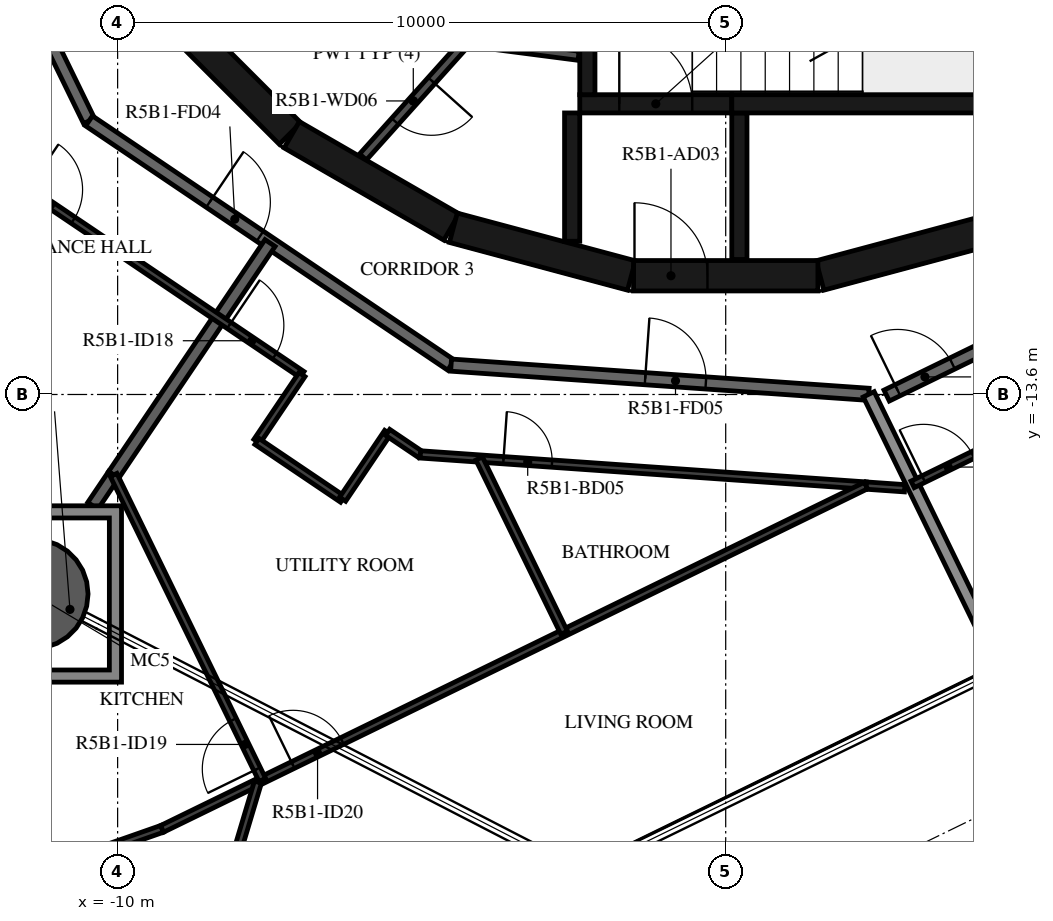
"""IFC4 building model, lengths in metres.
Left out: names, types, materials, properties, quantities, classifications, styles, units other than length and angle.
Written with IfcOpenShell. Run it as: python <this file> out.ifc"""

import sys

from ifc_helpers import new_model, si_unit, direction, frame, frame_2d, origin, origin_2d, place, context, subcontext, project, spatial, polyline, rectangle, hollow_circle, outline, extrude, element, fill, save


model = new_model("IFC4")
c1 = context("Model", 3, precision=1e-05, world=origin(), true_north=direction((0.0, 1.0)))
c2 = subcontext(c1, "Body", "Model", "MODEL_VIEW")
j1 = project(units=[si_unit("LENGTHUNIT", "METRE"), si_unit("PLANEANGLEUNIT", "RADIAN")], contexts=[c1])
p1 = place(None, origin())
s1 = spatial("IfcSite", under=j1, at=p1, CompositionType="ELEMENT")
p2 = place(p1, origin())
s2 = spatial("IfcBuilding", under=s1, at=p2, CompositionType="ELEMENT")
p3 = place(p2, frame((0.0, 0.0, 198.9)))
s3 = spatial("IfcBuildingStorey", under=s2, at=p3, CompositionType="ELEMENT", Elevation=198.9)
p4 = place(p3, frame((-11.386, -16.881, -0.38), z_axis=(0.0, 0.0, 1.0), x_axis=(1.0, 0.0, 0.0)))
e1 = element("IfcColumn", 1, at=p4, inside=s3, PredefinedType="COLUMN", context=c2, shape_type="SweptSolid", body=[
    extrude(hollow_circle(Radius=0.9, WallThickness=0.04, at=origin_2d()), origin(), (0.0, 0.0, 1.0), 3.5),
])
p5 = place(p3, frame((1.55, -11.643, 0.0), z_axis=(0.0, 0.0, 1.0), x_axis=(0.965948410781, 0.258734743916, 0.0)))
e2 = element("IfcWall", 2, at=p5, inside=s3, PredefinedType="SHEAR", context=c2, shape_type="SweptSolid", body=[
    extrude(rectangle(XDim=3.033, YDim=0.5, at=frame_2d((1.516, 0.0))), origin(), (0.0, 0.0, 1.0), 3.12),
])
p6 = place(p3, frame((-9.308, -7.164, 0.0), z_axis=(0.0, 0.0, 1.0), x_axis=(0.707106781187, -0.707106781187, 0.0)))
e3 = element("IfcWall", 3, at=p6, inside=s3, PredefinedType="SHEAR", context=c2, shape_type="SweptSolid", body=[
    extrude(rectangle(XDim=3.032, YDim=0.5, at=frame_2d((1.516, 0.0))), origin(), (0.0, 0.0, 1.0), 3.12),
])
for number, where, z_axis, x_axis in (
    (4, (-7.137, -9.329, 0.0), (0.0, 0.0, 1.0), (0.866, -0.5, 0.0)),
    (5, (-4.479, -10.858, 0.0), (0.0, 0.0, 1.0), (0.966, -0.259, 0.0)),
):
    element("IfcWall", number, at=place(p3, frame(where, z_axis=z_axis, x_axis=x_axis)), inside=s3, PredefinedType="SHEAR", context=c2, shape_type="SweptSolid", body=[
        extrude(rectangle(XDim=3.033, YDim=0.5, at=frame_2d((1.516, 0.0))), origin(), (0.0, 0.0, 1.0), 3.12),
    ])
p7 = place(p3, frame((-1.516, -11.647, 0.0), z_axis=(0.0, 0.0, 1.0), x_axis=(1.0, 0.0, 0.0)))
e6 = element("IfcWall", 6, at=p7, inside=s3, PredefinedType="SHEAR", context=c2, shape_type="SweptSolid", body=[
    extrude(rectangle(XDim=3.033, YDim=0.5, at=frame_2d((1.516, 0.0))), origin(), (0.0, 0.0, 1.0), 3.12),
])
p8 = place(p7, frame((0.016, 0.0, 0.0)))
e7 = element("IfcOpeningElement", 7, at=p8, cuts=e6, PredefinedType="OPENING", context=c2, shape_type="SweptSolid", body=[
    extrude(rectangle(XDim=1.2, YDim=2.1, at=frame_2d((0.6, 1.05))), frame((0.0, 0.26, 0.0), z_axis=(0.0, -1.0, 0.0), x_axis=(1.0, 0.0, 0.0)), (0.0, 0.0, 1.0), 0.52),
])
p9 = place(p3, frame((-2.275, -8.67, 0.0), z_axis=(0.0, 0.0, 1.0), x_axis=(0.0, 1.0, 0.0)))
e8 = element("IfcWall", 8, at=p9, inside=s3, PredefinedType="SHEAR", context=c2, shape_type="SweptSolid", body=[
    extrude(rectangle(XDim=3.32, YDim=0.25, at=frame_2d((1.66, 0.0))), origin(), (0.0, 0.0, 1.0), 3.12),
])
p10 = place(p3, frame((0.1, -8.82, 0.0), z_axis=(0.0, 0.0, 1.0), x_axis=(1.0, 0.0, 0.0)))
e9 = element("IfcWall", 9, at=p10, inside=s3, PredefinedType="SHEAR", context=c2, shape_type="SweptSolid", body=[
    extrude(rectangle(XDim=4.55, YDim=0.3, at=frame_2d((2.275, 0.0))), origin(), (0.0, 0.0, 1.0), 3.12),
])
p11 = place(p3, frame((-2.4, -8.82, 0.0), z_axis=(0.0, 0.0, 1.0), x_axis=(1.0, 0.0, 0.0)))
e10 = element("IfcWall", 10, at=p11, inside=s3, PredefinedType="SHEAR", context=c2, shape_type="SweptSolid", body=[
    extrude(rectangle(XDim=2.5, YDim=0.3, at=frame_2d((1.25, 0.0))), origin(), (0.0, 0.0, 1.0), 3.12),
])
p12 = place(p11, frame((0.65, 0.0, 0.0)))
e11 = element("IfcOpeningElement", 11, at=p12, cuts=e10, PredefinedType="OPENING", context=c2, shape_type="SweptSolid", body=[
    extrude(rectangle(XDim=1.2, YDim=2.1, at=frame_2d((0.6, 1.05))), frame((0.0, 0.16, 0.0), z_axis=(0.0, -1.0, 0.0), x_axis=(1.0, 0.0, 0.0)), (0.0, 0.0, 1.0), 0.32),
])
p13 = place(p3, frame((-2.525, -8.97, 0.0), z_axis=(0.0, 0.0, 1.0), x_axis=(0.0, -1.0, 0.0)))
e12 = element("IfcWall", 12, at=p13, inside=s3, PredefinedType="SHEAR", context=c2, shape_type="SweptSolid", body=[
    extrude(rectangle(XDim=2.11, YDim=0.25, at=frame_2d((1.055, 0.0))), origin(), (0.0, 0.0, 1.0), 3.12),
])
p14 = place(p3, frame((0.225, -8.97, 0.0), z_axis=(0.0, 0.0, 1.0), x_axis=(0.0, -1.0, 0.0)))
e13 = element("IfcWall", 13, at=p14, inside=s3, PredefinedType="SHEAR", context=c2, shape_type="SweptSolid", body=[
    extrude(rectangle(XDim=2.41, YDim=0.25, at=frame_2d((1.205, 0.0))), origin(), (0.0, 0.0, 1.0), 3.12),
])
p15 = place(p3, frame((-4.311, -7.851, 0.0), z_axis=(0.0, 0.0, 1.0), x_axis=(-0.667869133096, -0.744278725383, 0.0)))
e14 = element("IfcWall", 14, at=p15, inside=s3, PredefinedType="PARTITIONING", context=c2, shape_type="SweptSolid", body=[
    extrude(rectangle(XDim=2.476, YDim=0.15, at=frame_2d((1.238, 0.0))), origin(), (0.0, 0.0, 1.0), 3.12),
])
p16 = place(p15, frame((0.788, 0.0, 0.0)))
e15 = element("IfcOpeningElement", 15, at=p16, cuts=e14, PredefinedType="OPENING", context=c2, shape_type="SweptSolid", body=[
    extrude(rectangle(XDim=0.9, YDim=2.1, at=frame_2d((0.45, 1.05))), frame((0.0, 0.085, 0.0), z_axis=(0.0, -1.0, 0.0), x_axis=(1.0, 0.0, 0.0)), (0.0, 0.0, 1.0), 0.17),
])
p17 = place(p3, frame((-4.198, -7.799, 0.0), z_axis=(0.0, 0.0, 1.0), x_axis=(0.991686747293, -0.128675542523, 0.0)))
e16 = element("IfcWall", 16, at=p17, inside=s3, PredefinedType="PARTITIONING", context=c2, shape_type="SweptSolid", body=[
    extrude(rectangle(XDim=1.793, YDim=0.15, at=frame_2d((0.896, 0.0))), origin(), (0.0, 0.0, 1.0), 3.12),
])
p18 = place(p3, frame((-11.633, -6.716, 0.0), z_axis=(0.0, 0.0, 1.0), x_axis=(0.438322116278, -0.898817958422, 0.0)))
e17 = element("IfcWall", 17, at=p18, inside=s3, PredefinedType="STANDARD", context=c2, shape_type="SweptSolid", body=[
    extrude(rectangle(XDim=2.654, YDim=0.2, at=frame_2d((1.327, 0.0))), origin(), (0.0, 0.0, 1.0), 3.12),
])
p19 = place(p3, frame((-10.47, -9.101, 0.0), z_axis=(0.0, 0.0, 1.0), x_axis=(0.829035841718, -0.559195469534, 0.0)))
e18 = element("IfcWall", 18, at=p19, inside=s3, PredefinedType="STANDARD", context=c2, shape_type="SweptSolid", body=[
    extrude(rectangle(XDim=7.181, YDim=0.2, at=frame_2d((3.591, 0.0))), origin(), (0.0, 0.0, 1.0), 3.12),
])
p20 = place(p19, frame((2.39, 0.0, 0.0)))
e19 = element("IfcOpeningElement", 19, at=p20, cuts=e18, PredefinedType="OPENING", context=c2, shape_type="SweptSolid", body=[
    extrude(rectangle(XDim=1.0, YDim=2.1, at=frame_2d((0.5, 1.05))), frame((0.0, 0.11, 0.0), z_axis=(0.0, -1.0, 0.0), x_axis=(1.0, 0.0, 0.0)), (0.0, 0.0, 1.0), 0.22),
])
p21 = place(p3, frame((-4.517, -13.117, 0.0), z_axis=(0.0, 0.0, 1.0), x_axis=(0.997564669554, -0.069747616856, 0.0)))
e20 = element("IfcWall", 20, at=p21, inside=s3, PredefinedType="STANDARD", context=c2, shape_type="SweptSolid", body=[
    extrude(rectangle(XDim=6.885, YDim=0.2, at=frame_2d((3.443, 0.0))), origin(), (0.0, 0.0, 1.0), 3.12),
])
p22 = place(p21, frame((3.2, 0.0, 0.0)))
e21 = element("IfcOpeningElement", 21, at=p22, cuts=e20, PredefinedType="OPENING", context=c2, shape_type="SweptSolid", body=[
    extrude(rectangle(XDim=1.0, YDim=2.1, at=frame_2d((0.5, 1.05))), frame((0.0, 0.11, 0.0), z_axis=(0.0, -1.0, 0.0), x_axis=(1.0, 0.0, 0.0)), (0.0, 0.0, 1.0), 0.22),
])
p23 = place(p3, frame((2.647, -13.618, 0.0), z_axis=(0.0, 0.0, 1.0), x_axis=(0.898796543751, 0.438366026218, 0.0)))
e22 = element("IfcWall", 22, at=p23, inside=s3, PredefinedType="STANDARD", context=c2, shape_type="SweptSolid", body=[
    extrude(rectangle(XDim=7.181, YDim=0.2, at=frame_2d((3.591, 0.0))), origin(), (0.0, 0.0, 1.0), 3.12),
])
p24 = place(p23, frame((0.2, 0.0, 0.0)))
e23 = element("IfcOpeningElement", 23, at=p24, cuts=e22, PredefinedType="OPENING", context=c2, shape_type="SweptSolid", body=[
    extrude(rectangle(XDim=1.0, YDim=2.1, at=frame_2d((0.5, 1.05))), frame((0.0, 0.11, 0.0), z_axis=(0.0, -1.0, 0.0), x_axis=(1.0, 0.0, 0.0)), (0.0, 0.0, 1.0), 0.22),
])
p25 = place(p3, frame((-10.066, -14.924, 0.0), z_axis=(0.0, 0.0, 1.0), x_axis=(0.559173899945, 0.829050390278, 0.0)))
e24 = element("IfcWall", 24, at=p25, inside=s3, PredefinedType="STANDARD", context=c2, shape_type="SweptSolid", body=[
    extrude(rectangle(XDim=4.601, YDim=0.2, at=frame_2d((2.301, 0.0))), origin(), (0.0, 0.0, 1.0), 3.12),
])
p26 = place(p3, frame((-10.408, -15.43, 0.0), z_axis=(0.0, 0.0, 1.0), x_axis=(0.559390561924, 0.828904215956, 0.0)))
e25 = element("IfcWall", 25, at=p26, inside=s3, PredefinedType="STANDARD", context=c2, shape_type="SweptSolid", body=[
    extrude(rectangle(XDim=0.612, YDim=0.2, at=frame_2d((0.306, 0.0))), origin(), (0.0, 0.0, 1.0), 3.12),
])
p27 = place(p3, frame((4.512, -18.027, 0.0), z_axis=(0.0, 0.0, 1.0), x_axis=(-0.438374835386, 0.898792247241, 0.0)))
e26 = element("IfcWall", 26, at=p27, inside=s3, PredefinedType="STANDARD", context=c2, shape_type="SweptSolid", body=[
    extrude(rectangle(XDim=4.929, YDim=0.2, at=frame_2d((2.464, 0.0))), origin(), (0.0, 0.0, 1.0), 2.73),
])
p28 = place(p3, frame((-11.642, -10.12, 0.0), z_axis=(0.0, 0.0, 1.0), x_axis=(0.829033377599, -0.559199122698, 0.0)))
e27 = element("IfcWall", 27, at=p28, inside=s3, PredefinedType="PARTITIONING", context=c2, shape_type="SweptSolid", body=[
    extrude(rectangle(XDim=5.638, YDim=0.12, at=frame_2d((2.819, 0.0))), origin(), (0.0, 0.0, 1.0), 3.12),
])
p29 = place(p28, frame((0.2, 0.0, 0.0)))
e28 = element("IfcOpeningElement", 28, at=p29, cuts=e27, PredefinedType="OPENING", context=c2, shape_type="SweptSolid", body=[
    extrude(rectangle(XDim=0.9, YDim=2.1, at=frame_2d((0.45, 1.05))), frame((0.0, 0.07, 0.0), z_axis=(0.0, -1.0, 0.0), x_axis=(1.0, 0.0, 0.0)), (0.0, 0.0, 1.0), 0.14),
])
p30 = place(p28, frame((4.192, 0.0, 0.0)))
e29 = element("IfcOpeningElement", 29, at=p30, cuts=e27, PredefinedType="OPENING", context=c2, shape_type="SweptSolid", body=[
    extrude(rectangle(XDim=0.9, YDim=2.1, at=frame_2d((0.45, 1.05))), frame((0.0, 0.07, 0.0), z_axis=(0.0, -1.0, 0.0), x_axis=(1.0, 0.0, 0.0)), (0.0, 0.0, 1.0), 0.14),
])
p31 = place(p3, frame((-6.968, -13.273, 0.0), z_axis=(0.0, 0.0, 1.0), x_axis=(-0.559283007371, -0.828976789582, 0.0)))
e30 = element("IfcWall", 30, at=p31, inside=s3, PredefinedType="PARTITIONING", context=c2, shape_type="SweptSolid", body=[
    extrude(rectangle(XDim=1.325, YDim=0.12, at=frame_2d((0.663, 0.0))), origin(), (0.0, 0.0, 1.0), 3.12),
])
p32 = place(p3, frame((-7.709, -14.371, 0.0), z_axis=(0.0, 0.0, 1.0), x_axis=(0.829033422808, -0.559199055675, 0.0)))
e31 = element("IfcWall", 31, at=p32, inside=s3, PredefinedType="PARTITIONING", context=c2, shape_type="SweptSolid", body=[
    extrude(rectangle(XDim=1.7, YDim=0.12, at=frame_2d((0.85, 0.0))), origin(), (0.0, 0.0, 1.0), 3.12),
])
p33 = place(p3, frame((-6.3, -15.322, 0.0), z_axis=(0.0, 0.0, 1.0), x_axis=(0.559197608403, 0.829034399019, 0.0)))
e32 = element("IfcWall", 32, at=p33, inside=s3, PredefinedType="PARTITIONING", context=c2, shape_type="SweptSolid", body=[
    extrude(rectangle(XDim=1.325, YDim=0.12, at=frame_2d((0.663, 0.0))), origin(), (0.0, 0.0, 1.0), 3.12),
])
p34 = place(p3, frame((-5.559, -14.223, 0.0), z_axis=(0.0, 0.0, 1.0), x_axis=(0.828844300469, -0.559479334363, 0.0)))
e33 = element("IfcWall", 33, at=p34, inside=s3, PredefinedType="PARTITIONING", context=c2, shape_type="SweptSolid", body=[
    extrude(rectangle(XDim=0.647, YDim=0.12, at=frame_2d((0.324, 0.0))), origin(), (0.0, 0.0, 1.0), 3.12),
])
p35 = place(p3, frame((-5.022, -14.585, 0.0), z_axis=(0.0, 0.0, 1.0), x_axis=(0.997564196041, -0.06975438895, 0.0)))
e34 = element("IfcWall", 34, at=p35, inside=s3, PredefinedType="PARTITIONING", context=c2, shape_type="SweptSolid", body=[
    extrude(rectangle(XDim=7.346, YDim=0.12, at=frame_2d((3.673, 0.0))), origin(), (0.0, 0.0, 1.0), 3.12),
])
p36 = place(p35, frame((1.37, 0.0, 0.0)))
e35 = element("IfcOpeningElement", 35, at=p36, cuts=e34, PredefinedType="OPENING", context=c2, shape_type="SweptSolid", body=[
    extrude(rectangle(XDim=0.8, YDim=2.1, at=frame_2d((0.4, 1.05))), frame((0.0, 0.07, 0.0), z_axis=(0.0, -1.0, 0.0), x_axis=(1.0, 0.0, 0.0)), (0.0, 0.0, 1.0), 0.14),
])
p37 = place(p3, frame((2.306, -15.098, 0.0), z_axis=(0.0, 0.0, 1.0), x_axis=(0.99757571817, -0.069589413839, 0.0)))
e36 = element("IfcWall", 36, at=p37, inside=s3, PredefinedType="PARTITIONING", context=c2, shape_type="SweptSolid", body=[
    extrude(rectangle(XDim=0.638, YDim=0.12, at=frame_2d((0.319, 0.0))), origin(), (0.0, 0.0, 1.0), 3.12),
])
p38 = place(p3, frame((-10.427, -21.149, 0.0), z_axis=(0.0, 0.0, 1.0), x_axis=(0.943591256744, 0.331112579338, 0.0)))
e37 = element("IfcWall", 37, at=p38, inside=s3, PredefinedType="PARTITIONING", context=c2, shape_type="SweptSolid", body=[
    extrude(rectangle(XDim=1.227, YDim=0.12, at=frame_2d((0.613, 0.0))), origin(), (0.0, 0.0, 1.0), 3.12),
])
p39 = place(p3, frame((-9.269, -20.743, 0.0), z_axis=(0.0, 0.0, 1.0), x_axis=(0.898796865831, 0.438365365846, 0.0)))
e38 = element("IfcWall", 38, at=p39, inside=s3, PredefinedType="PARTITIONING", context=c2, shape_type="SweptSolid", body=[
    extrude(rectangle(XDim=12.879, YDim=0.12, at=frame_2d((6.439, 0.0))), origin(), (0.0, 0.0, 1.0), 3.12),
])
p40 = place(p39, frame((2.395, 0.0, 0.0)))
e39 = element("IfcOpeningElement", 39, at=p40, cuts=e38, PredefinedType="OPENING", context=c2, shape_type="SweptSolid", body=[
    extrude(rectangle(XDim=0.9, YDim=2.1, at=frame_2d((0.45, 1.05))), frame((0.0, 0.07, 0.0), z_axis=(0.0, -1.0, 0.0), x_axis=(1.0, 0.0, 0.0)), (0.0, 0.0, 1.0), 0.14),
])
p41 = place(p3, frame((-7.62, -19.939, 0.0), z_axis=(0.0, 0.0, 1.0), x_axis=(-0.438353807908, 0.89880250283, 0.0)))
e40 = element("IfcWall", 40, at=p41, inside=s3, PredefinedType="PARTITIONING", context=c2, shape_type="SweptSolid", body=[
    extrude(rectangle(XDim=5.58, YDim=0.12, at=frame_2d((2.79, 0.0))), origin(), (0.0, 0.0, 1.0), 3.12),
])
p42 = place(p41, frame((0.2, 0.0, 0.0)))
e41 = element("IfcOpeningElement", 41, at=p42, cuts=e40, PredefinedType="OPENING", context=c2, shape_type="SweptSolid", body=[
    extrude(rectangle(XDim=0.9, YDim=2.1, at=frame_2d((0.45, 1.05))), frame((0.0, 0.07, 0.0), z_axis=(0.0, -1.0, 0.0), x_axis=(1.0, 0.0, 0.0)), (0.0, 0.0, 1.0), 0.14),
])
p43 = place(p3, frame((-9.041, -24.479, 0.0), z_axis=(0.0, 0.0, 1.0), x_axis=(0.286804727102, 0.957989064923, 0.0)))
e42 = element("IfcWall", 42, at=p43, inside=s3, PredefinedType="PARTITIONING", context=c2, shape_type="SweptSolid", body=[
    extrude(rectangle(XDim=4.701, YDim=0.12, at=frame_2d((2.351, 0.0))), origin(), (0.0, 0.0, 1.0), 3.12),
])
p44 = place(p43, frame((0.6, 0.0, 0.0)))
e43 = element("IfcOpeningElement", 43, at=p44, cuts=e42, PredefinedType="OPENING", context=c2, shape_type="SweptSolid", body=[
    extrude(rectangle(XDim=0.9, YDim=2.1, at=frame_2d((0.45, 1.05))), frame((0.0, 0.07, 0.0), z_axis=(0.0, -1.0, 0.0), x_axis=(1.0, 0.0, 0.0)), (0.0, 0.0, 1.0), 0.14),
])
p45 = place(p3, frame((-2.657, -17.518, 0.0), z_axis=(0.0, 0.0, 1.0), x_axis=(-0.438339139088, 0.898809656792, 0.0)))
e44 = element("IfcWall", 44, at=p45, inside=s3, PredefinedType="PARTITIONING", context=c2, shape_type="SweptSolid", body=[
    extrude(rectangle(XDim=3.188, YDim=0.12, at=frame_2d((1.594, 0.0))), origin(), (0.0, 0.0, 1.0), 3.12),
])
p46 = place(p3, frame((3.074, -15.078, 0.0), z_axis=(0.0, 0.0, 1.0), x_axis=(0.898793586225, 0.43837209008, 0.0)))
e45 = element("IfcWall", 45, at=p46, inside=s3, PredefinedType="PARTITIONING", context=c2, shape_type="SweptSolid", body=[
    extrude(rectangle(XDim=7.839, YDim=0.12, at=frame_2d((3.92, 0.0))), origin(), (0.0, 0.0, 1.0), 3.12),
])
p47 = place(p46, frame((0.2, 0.0, 0.0)))
e46 = element("IfcOpeningElement", 46, at=p47, cuts=e45, PredefinedType="OPENING", context=c2, shape_type="SweptSolid", body=[
    extrude(rectangle(XDim=0.9, YDim=2.1, at=frame_2d((0.45, 1.05))), frame((0.0, 0.07, 0.0), z_axis=(0.0, -1.0, 0.0), x_axis=(1.0, 0.0, 0.0)), (0.0, 0.0, 1.0), 0.14),
])
p48 = place(p3, origin())
e47 = element("IfcWall", 47, at=p48, inside=s3, PredefinedType="STANDARD", context=c2, shape_type="SweptSolid", body=[
    extrude(outline(polyline([(-9.936, -15.43), (-9.936, -18.331), (-12.836, -18.331), (-12.836, -15.43), (-9.936, -15.43)]), holes=[polyline([(-12.636, -18.131), (-10.136, -18.131), (-10.136, -15.631), (-12.636, -15.631), (-12.636, -18.131)])]), origin(), (0.0, 0.0, 1.0), 3.12),
])
p49 = place(p12, origin())
e48 = element("IfcDoor", 48, at=p49, inside=s3, OperationType="SINGLE_SWING_LEFT", PredefinedType="DOOR", context=c2, shape_type="SweptSolid", body=[
    extrude(rectangle(XDim=1.2, YDim=2.1, at=frame_2d((0.6, 1.05))), frame((0.0, 0.025, 0.0), z_axis=(0.0, -1.0, 0.0), x_axis=(1.0, 0.0, 0.0)), (0.0, 0.0, 1.0), 0.05),
])
fill(e11, e48)
p50 = place(p8, origin())
e49 = element("IfcDoor", 49, at=p50, inside=s3, OperationType="SINGLE_SWING_RIGHT", PredefinedType="DOOR", context=c2, shape_type="SweptSolid", body=[
    extrude(rectangle(XDim=1.2, YDim=2.1, at=frame_2d((0.6, 1.05))), frame((0.0, 0.025, 0.0), z_axis=(0.0, -1.0, 0.0), x_axis=(1.0, 0.0, 0.0)), (0.0, 0.0, 1.0), 0.05),
])
fill(e7, e49)
p51 = place(p16, origin())
e50 = element("IfcDoor", 50, at=p51, inside=s3, OperationType="SINGLE_SWING_RIGHT", PredefinedType="DOOR", context=c2, shape_type="SweptSolid", body=[
    extrude(rectangle(XDim=0.9, YDim=2.1, at=frame_2d((0.45, 1.05))), frame((0.0, 0.025, 0.0), z_axis=(0.0, -1.0, 0.0), x_axis=(1.0, 0.0, 0.0)), (0.0, 0.0, 1.0), 0.05),
])
fill(e15, e50)
p52 = place(p20, origin())
e51 = element("IfcDoor", 51, at=p52, inside=s3, OperationType="SINGLE_SWING_RIGHT", PredefinedType="DOOR", context=c2, shape_type="SweptSolid", body=[
    extrude(rectangle(XDim=1.0, YDim=2.1, at=frame_2d((0.5, 1.05))), frame((0.0, 0.025, 0.0), z_axis=(0.0, -1.0, 0.0), x_axis=(1.0, 0.0, 0.0)), (0.0, 0.0, 1.0), 0.05),
])
fill(e19, e51)
p53 = place(p29, origin())
e52 = element("IfcDoor", 52, at=p53, inside=s3, OperationType="SINGLE_SWING_RIGHT", PredefinedType="DOOR", context=c2, shape_type="SweptSolid", body=[
    extrude(rectangle(XDim=0.9, YDim=2.1, at=frame_2d((0.45, 1.05))), frame((0.0, 0.025, 0.0), z_axis=(0.0, -1.0, 0.0), x_axis=(1.0, 0.0, 0.0)), (0.0, 0.0, 1.0), 0.05),
])
fill(e28, e52)
p54 = place(p22, origin())
e53 = element("IfcDoor", 53, at=p54, inside=s3, OperationType="SINGLE_SWING_LEFT", PredefinedType="DOOR", context=c2, shape_type="SweptSolid", body=[
    extrude(rectangle(XDim=1.0, YDim=2.1, at=frame_2d((0.5, 1.05))), frame((0.0, 0.025, 0.0), z_axis=(0.0, -1.0, 0.0), x_axis=(1.0, 0.0, 0.0)), (0.0, 0.0, 1.0), 0.05),
])
fill(e21, e53)
p55 = place(p30, origin())
e54 = element("IfcDoor", 54, at=p55, inside=s3, OperationType="SINGLE_SWING_LEFT", PredefinedType="DOOR", context=c2, shape_type="SweptSolid", body=[
    extrude(rectangle(XDim=0.9, YDim=2.1, at=frame_2d((0.45, 1.05))), frame((0.0, 0.025, 0.0), z_axis=(0.0, -1.0, 0.0), x_axis=(1.0, 0.0, 0.0)), (0.0, 0.0, 1.0), 0.05),
])
fill(e29, e54)
p56 = place(p36, origin())
e55 = element("IfcDoor", 55, at=p56, inside=s3, OperationType="SINGLE_SWING_LEFT", PredefinedType="DOOR", context=c2, shape_type="SweptSolid", body=[
    extrude(rectangle(XDim=0.8, YDim=2.1, at=frame_2d((0.4, 1.05))), frame((0.0, 0.025, 0.0), z_axis=(0.0, -1.0, 0.0), x_axis=(1.0, 0.0, 0.0)), (0.0, 0.0, 1.0), 0.05),
])
fill(e35, e55)
p57 = place(p42, origin())
e56 = element("IfcDoor", 56, at=p57, inside=s3, OperationType="SINGLE_SWING_LEFT", PredefinedType="DOOR", context=c2, shape_type="SweptSolid", body=[
    extrude(rectangle(XDim=0.9, YDim=2.1, at=frame_2d((0.45, 1.05))), frame((0.0, 0.025, 0.0), z_axis=(0.0, -1.0, 0.0), x_axis=(1.0, 0.0, 0.0)), (0.0, 0.0, 1.0), 0.05),
])
fill(e41, e56)
p58 = place(p40, origin())
e57 = element("IfcDoor", 57, at=p58, inside=s3, OperationType="SINGLE_SWING_LEFT", PredefinedType="DOOR", context=c2, shape_type="SweptSolid", body=[
    extrude(rectangle(XDim=0.9, YDim=2.1, at=frame_2d((0.45, 1.05))), frame((0.0, 0.025, 0.0), z_axis=(0.0, -1.0, 0.0), x_axis=(1.0, 0.0, 0.0)), (0.0, 0.0, 1.0), 0.05),
])
fill(e39, e57)
p59 = place(p24, origin())
e58 = element("IfcDoor", 58, at=p59, inside=s3, OperationType="SINGLE_SWING_LEFT", PredefinedType="DOOR", context=c2, shape_type="SweptSolid", body=[
    extrude(rectangle(XDim=1.0, YDim=2.1, at=frame_2d((0.5, 1.05))), frame((0.0, 0.025, 0.0), z_axis=(0.0, -1.0, 0.0), x_axis=(1.0, 0.0, 0.0)), (0.0, 0.0, 1.0), 0.05),
])
fill(e23, e58)
p60 = place(p47, origin())
e59 = element("IfcDoor", 59, at=p60, inside=s3, OperationType="SINGLE_SWING_LEFT", PredefinedType="DOOR", context=c2, shape_type="SweptSolid", body=[
    extrude(rectangle(XDim=0.9, YDim=2.1, at=frame_2d((0.45, 1.05))), frame((0.0, 0.025, 0.0), z_axis=(0.0, -1.0, 0.0), x_axis=(1.0, 0.0, 0.0)), (0.0, 0.0, 1.0), 0.05),
])
fill(e46, e59)
save(model, sys.argv[1])
